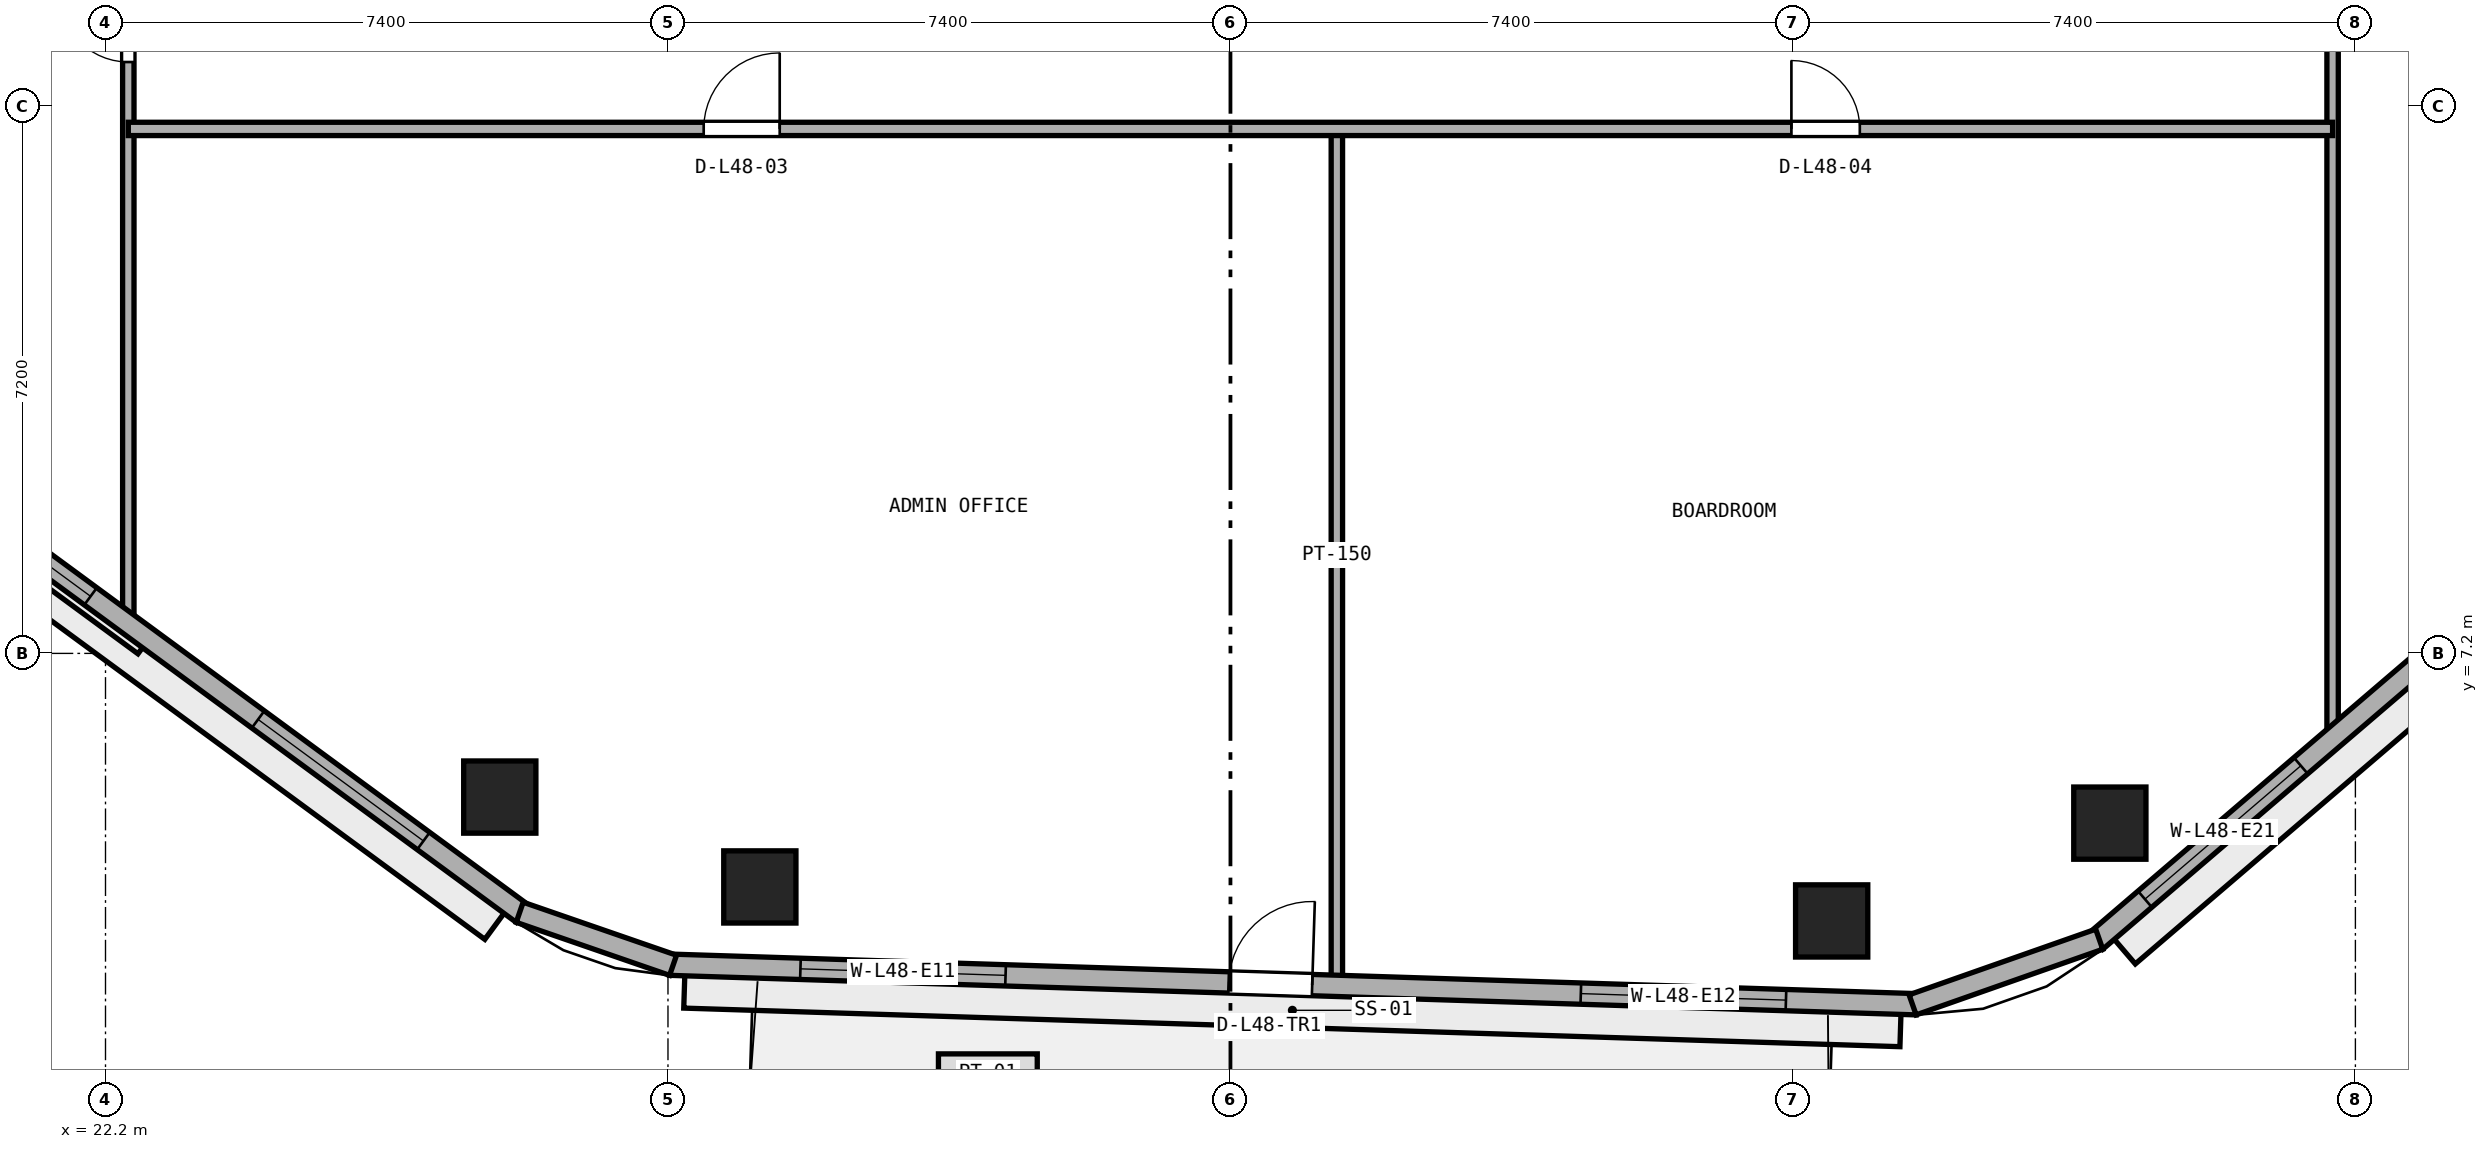
"""IFC4 building model, lengths in metres.
Left out: names, types, materials, properties, quantities, classifications, styles, units other than length and angle.
Written with IfcOpenShell. Run it as: python <this file> out.ifc"""

import sys

from ifc_helpers import new_model, si_unit, direction, frame, frame_2d, origin, origin_2d, place, context, subcontext, project, spatial, rectangle, extrude, element, fill, save


model = new_model("IFC4")
c1 = context("Model", 3, precision=1e-05, world=origin(), true_north=direction((0.0, 1.0)))
c2 = subcontext(c1, "Body", "Model", "MODEL_VIEW")
j1 = project(units=[si_unit("LENGTHUNIT", "METRE"), si_unit("PLANEANGLEUNIT", "RADIAN")], contexts=[c1])
p1 = place(None, origin())
s1 = spatial("IfcSite", under=j1, at=p1, CompositionType="ELEMENT")
p2 = place(p1, origin())
s2 = spatial("IfcBuilding", under=s1, at=p2, CompositionType="ELEMENT")
p3 = place(p2, frame((0.0, 0.0, 189.6)))
s3 = spatial("IfcBuildingStorey", under=s2, at=p3, CompositionType="ELEMENT", Elevation=189.6)
for number, where, z_axis, x_axis in (
    (1, (30.809, 4.127, 0.0), (0.0, 0.0, 1.0), (1.0, 0.0, 0.0)),
    (2, (44.91, 3.68, 0.0), (0.0, 0.0, 1.0), (1.0, 0.0, 0.0)),
    (3, (48.57, 4.967, 0.0), (0.0, 0.0, 1.0), (1.0, 0.0, 0.0)),
    (4, (27.387, 5.31, 0.0), (0.0, 0.0, 1.0), (1.0, 0.0, 0.0)),
):
    element("IfcColumn", number, at=place(p3, frame(where, z_axis=z_axis, x_axis=x_axis)), inside=s3, PredefinedType="COLUMN", context=c2, shape_type="SweptSolid", body=[
        extrude(rectangle(XDim=0.95, YDim=0.95, at=origin_2d()), origin(), (0.0, 0.0, 1.0), 3.8),
    ])
p4 = place(p3, frame((51.5, 6.036, 0.0), z_axis=(0.0, 0.0, 1.0), x_axis=(0.0, 1.0, 0.0)))
e5 = element("IfcWall", 5, at=p4, inside=s3, PredefinedType="PARTITIONING", context=c2, shape_type="SweptSolid", body=[
    extrude(rectangle(XDim=17.814, YDim=0.15, at=frame_2d((8.907, 0.0))), origin(), (0.0, 0.0, 1.0), 3.54),
])
p5 = place(p4, frame((10.464, 0.0, 0.0)))
e6 = element("IfcOpeningElement", 6, at=p5, cuts=e5, PredefinedType="OPENING", context=c2, shape_type="SweptSolid", body=[
    extrude(rectangle(XDim=0.9, YDim=2.1, at=frame_2d((0.45, 1.05))), frame((0.0, 0.085, 0.0), z_axis=(0.0, -1.0, 0.0), x_axis=(1.0, 0.0, 0.0)), (0.0, 0.0, 1.0), 0.17),
])
p6 = place(p3, frame((38.4, 2.891, 0.0), z_axis=(0.0, 0.0, 1.0), x_axis=(0.0, 1.0, 0.0)))
e7 = element("IfcWall", 7, at=p6, inside=s3, PredefinedType="PARTITIONING", context=c2, shape_type="SweptSolid", body=[
    extrude(rectangle(XDim=11.209, YDim=0.15, at=frame_2d((5.604, 0.0))), origin(), (0.0, 0.0, 1.0), 3.54),
])
p7 = place(p3, frame((22.5, 7.552, 0.0), z_axis=(0.0, 0.0, 1.0), x_axis=(0.0, 1.0, 0.0)))
e8 = element("IfcWall", 8, at=p7, inside=s3, PredefinedType="PARTITIONING", context=c2, shape_type="SweptSolid", body=[
    extrude(rectangle(XDim=9.448, YDim=0.15, at=frame_2d((4.724, 0.0))), origin(), (0.0, 0.0, 1.0), 3.54),
])
p8 = place(p7, frame((7.427, 0.0, 0.0)))
e9 = element("IfcOpeningElement", 9, at=p8, cuts=e8, PredefinedType="OPENING", context=c2, shape_type="SweptSolid", body=[
    extrude(rectangle(XDim=0.9, YDim=2.1, at=frame_2d((0.45, 1.05))), frame((0.0, 0.085, 0.0), z_axis=(0.0, -1.0, 0.0), x_axis=(1.0, 0.0, 0.0)), (0.0, 0.0, 1.0), 0.17),
])
p9 = place(p3, frame((22.5, 14.1, 0.0), z_axis=(0.0, 0.0, 1.0), x_axis=(1.0, 0.0, 0.0)))
e10 = element("IfcWall", 10, at=p9, inside=s3, PredefinedType="PARTITIONING", context=c2, shape_type="SweptSolid", body=[
    extrude(rectangle(XDim=29.0, YDim=0.175, at=frame_2d((14.5, 0.0))), origin(), (0.0, 0.0, 1.0), 3.54),
])
p10 = place(p9, frame((7.57, 0.0, 0.0)))
e11 = element("IfcOpeningElement", 11, at=p10, cuts=e10, PredefinedType="OPENING", context=c2, shape_type="SweptSolid", body=[
    extrude(rectangle(XDim=1.0, YDim=2.12, at=frame_2d((0.5, 1.06))), frame((0.0, 0.097, 0.0), z_axis=(0.0, -1.0, 0.0), x_axis=(1.0, 0.0, 0.0)), (0.0, 0.0, 1.0), 0.195),
])
p11 = place(p9, frame((21.88, 0.0, 0.0)))
e12 = element("IfcOpeningElement", 12, at=p11, cuts=e10, PredefinedType="OPENING", context=c2, shape_type="SweptSolid", body=[
    extrude(rectangle(XDim=0.9, YDim=2.1, at=frame_2d((0.45, 1.05))), frame((0.0, 0.097, 0.0), z_axis=(0.0, -1.0, 0.0), x_axis=(1.0, 0.0, 0.0)), (0.0, 0.0, 1.0), 0.195),
])
p12 = place(p3, frame((29.625, 3.104, 0.0), z_axis=(0.0, 0.0, 1.0), x_axis=(0.99949718661, -0.031707632487, 0.0)))
e13 = element("IfcWall", 13, at=p12, inside=s3, PredefinedType="STANDARD", context=c2, shape_type="SweptSolid", body=[
    extrude(rectangle(XDim=16.408, YDim=0.28, at=frame_2d((8.204, 0.0))), origin(), (0.0, 0.0, 1.0), 3.54),
])
p13 = place(p12, frame((7.354, 0.0, 0.0)))
e14 = element("IfcOpeningElement", 14, at=p13, cuts=e13, PredefinedType="OPENING", context=c2, shape_type="SweptSolid", body=[
    extrude(rectangle(XDim=1.1, YDim=2.2, at=frame_2d((0.55, 1.1))), frame((0.0, 0.15, 0.0), z_axis=(0.0, -1.0, 0.0), x_axis=(1.0, 0.0, 0.0)), (0.0, 0.0, 1.0), 0.3),
])
p14 = place(p12, frame((1.718, 0.0, 0.9)))
e15 = element("IfcOpeningElement", 15, at=p14, cuts=e13, PredefinedType="OPENING", context=c2, shape_type="SweptSolid", body=[
    extrude(rectangle(XDim=2.7, YDim=1.75, at=frame_2d((1.35, 0.875))), frame((0.0, 0.15, 0.0), z_axis=(0.0, -1.0, 0.0), x_axis=(1.0, 0.0, 0.0)), (0.0, 0.0, 1.0), 0.3),
])
p15 = place(p12, frame((11.99, 0.0, 0.9)))
e16 = element("IfcOpeningElement", 16, at=p15, cuts=e13, PredefinedType="OPENING", context=c2, shape_type="SweptSolid", body=[
    extrude(rectangle(XDim=2.7, YDim=1.75, at=frame_2d((1.35, 0.875))), frame((0.0, 0.15, 0.0), z_axis=(0.0, -1.0, 0.0), x_axis=(1.0, 0.0, 0.0)), (0.0, 0.0, 1.0), 0.3),
])
p16 = place(p3, frame((48.385, 3.414, 0.0), z_axis=(0.0, 0.0, 1.0), x_axis=(0.759700260779, 0.650273414628, 0.0)))
e17 = element("IfcWall", 17, at=p16, inside=s3, PredefinedType="STANDARD", context=c2, shape_type="SweptSolid", body=[
    extrude(rectangle(XDim=15.881, YDim=0.28, at=frame_2d((7.94, 0.0))), origin(), (0.0, 0.0, 1.0), 3.54),
])
p17 = place(p16, frame((0.85, 0.0, 0.9)))
e18 = element("IfcOpeningElement", 18, at=p17, cuts=e17, PredefinedType="OPENING", context=c2, shape_type="SweptSolid", body=[
    extrude(rectangle(XDim=2.7, YDim=1.75, at=frame_2d((1.35, 0.875))), frame((0.0, 0.15, 0.0), z_axis=(0.0, -1.0, 0.0), x_axis=(1.0, 0.0, 0.0)), (0.0, 0.0, 1.0), 0.3),
])
p18 = place(p16, frame((6.59, 0.0, 0.9)))
e19 = element("IfcOpeningElement", 19, at=p18, cuts=e17, PredefinedType="OPENING", context=c2, shape_type="SweptSolid", body=[
    extrude(rectangle(XDim=2.7, YDim=1.75, at=frame_2d((1.35, 0.875))), frame((0.0, 0.15, 0.0), z_axis=(0.0, -1.0, 0.0), x_axis=(1.0, 0.0, 0.0)), (0.0, 0.0, 1.0), 0.3),
])
p19 = place(p16, frame((11.551, 0.0, 0.9)))
e20 = element("IfcOpeningElement", 20, at=p19, cuts=e17, PredefinedType="OPENING", context=c2, shape_type="SweptSolid", body=[
    extrude(rectangle(XDim=2.7, YDim=1.75, at=frame_2d((1.35, 0.875))), frame((0.0, 0.15, 0.0), z_axis=(0.0, -1.0, 0.0), x_axis=(1.0, 0.0, 0.0)), (0.0, 0.0, 1.0), 0.3),
])
p20 = place(p3, frame((14.951, 13.134, 0.0), z_axis=(0.0, 0.0, 1.0), x_axis=(0.805804940328, -0.592181051827, 0.0)))
e21 = element("IfcWall", 21, at=p20, inside=s3, PredefinedType="STANDARD", context=c2, shape_type="SweptSolid", body=[
    extrude(rectangle(XDim=15.804, YDim=0.28, at=frame_2d((7.902, 0.0))), origin(), (0.0, 0.0, 1.0), 3.54),
])
p21 = place(p20, frame((1.617, 0.0, 0.9)))
e22 = element("IfcOpeningElement", 22, at=p21, cuts=e21, PredefinedType="OPENING", context=c2, shape_type="SweptSolid", body=[
    extrude(rectangle(XDim=2.7, YDim=1.75, at=frame_2d((1.35, 0.875))), frame((0.0, 0.15, 0.0), z_axis=(0.0, -1.0, 0.0), x_axis=(1.0, 0.0, 0.0)), (0.0, 0.0, 1.0), 0.3),
])
p22 = place(p20, frame((6.052, 0.0, 0.9)))
e23 = element("IfcOpeningElement", 23, at=p22, cuts=e21, PredefinedType="OPENING", context=c2, shape_type="SweptSolid", body=[
    extrude(rectangle(XDim=2.7, YDim=1.75, at=frame_2d((1.35, 0.875))), frame((0.0, 0.15, 0.0), z_axis=(0.0, -1.0, 0.0), x_axis=(1.0, 0.0, 0.0)), (0.0, 0.0, 1.0), 0.3),
])
p23 = place(p20, frame((11.487, 0.0, 0.9)))
e24 = element("IfcOpeningElement", 24, at=p23, cuts=e21, PredefinedType="OPENING", context=c2, shape_type="SweptSolid", body=[
    extrude(rectangle(XDim=2.7, YDim=1.75, at=frame_2d((1.35, 0.875))), frame((0.0, 0.15, 0.0), z_axis=(0.0, -1.0, 0.0), x_axis=(1.0, 0.0, 0.0)), (0.0, 0.0, 1.0), 0.3),
])
p24 = place(p3, frame((45.975, 2.576, 0.0), z_axis=(0.0, 0.0, 1.0), x_axis=(0.943377643365, 0.331720698781, 0.0)))
e25 = element("IfcWall", 25, at=p24, inside=s3, PredefinedType="STANDARD", context=c2, shape_type="SweptSolid", body=[
    extrude(rectangle(XDim=2.603, YDim=0.28, at=frame_2d((1.301, 0.0))), origin(), (0.0, 0.0, 1.0), 3.54),
])
p25 = place(p3, frame((27.649, 3.794, 0.0), z_axis=(0.0, 0.0, 1.0), x_axis=(0.945149124969, -0.326639145802, 0.0)))
e26 = element("IfcWall", 26, at=p25, inside=s3, PredefinedType="STANDARD", context=c2, shape_type="SweptSolid", body=[
    extrude(rectangle(XDim=2.135, YDim=0.28, at=frame_2d((1.067, 0.0))), origin(), (0.0, 0.0, 1.0), 3.54),
])
p26 = place(p10, origin())
e27 = element("IfcDoor", 27, at=p26, inside=s3, OperationType="SINGLE_SWING_RIGHT", PredefinedType="DOOR", context=c2, shape_type="SweptSolid", body=[
    extrude(rectangle(XDim=1.0, YDim=2.12, at=frame_2d((0.5, 1.06))), frame((0.0, 0.025, 0.0), z_axis=(0.0, -1.0, 0.0), x_axis=(1.0, 0.0, 0.0)), (0.0, 0.0, 1.0), 0.05),
])
fill(e11, e27)
p27 = place(p11, origin())
e28 = element("IfcDoor", 28, at=p27, inside=s3, OperationType="SINGLE_SWING_LEFT", PredefinedType="DOOR", context=c2, shape_type="SweptSolid", body=[
    extrude(rectangle(XDim=0.9, YDim=2.1, at=frame_2d((0.45, 1.05))), frame((0.0, 0.025, 0.0), z_axis=(0.0, -1.0, 0.0), x_axis=(1.0, 0.0, 0.0)), (0.0, 0.0, 1.0), 0.05),
])
fill(e12, e28)
p28 = place(p8, origin())
e29 = element("IfcDoor", 29, at=p28, inside=s3, OperationType="SINGLE_SWING_RIGHT", PredefinedType="DOOR", context=c2, shape_type="SweptSolid", body=[
    extrude(rectangle(XDim=0.9, YDim=2.1, at=frame_2d((0.45, 1.05))), frame((0.0, 0.025, 0.0), z_axis=(0.0, -1.0, 0.0), x_axis=(1.0, 0.0, 0.0)), (0.0, 0.0, 1.0), 0.05),
])
fill(e9, e29)
p29 = place(p13, origin())
e30 = element("IfcDoor", 30, at=p29, inside=s3, OperationType="SINGLE_SWING_RIGHT", PredefinedType="DOOR", context=c2, shape_type="SweptSolid", body=[
    extrude(rectangle(XDim=1.1, YDim=2.2, at=frame_2d((0.55, 1.1))), frame((0.0, 0.025, 0.0), z_axis=(0.0, -1.0, 0.0), x_axis=(1.0, 0.0, 0.0)), (0.0, 0.0, 1.0), 0.05),
])
fill(e14, e30)
p30 = place(p14, origin())
e31 = element("IfcWindow", 31, at=p30, inside=s3, PartitioningType="SINGLE_PANEL", PredefinedType="WINDOW", context=c2, shape_type="SweptSolid", body=[
    extrude(rectangle(XDim=2.7, YDim=1.75, at=frame_2d((1.35, 0.875))), frame((0.0, 0.03, 0.0), z_axis=(0.0, -1.0, 0.0), x_axis=(1.0, 0.0, 0.0)), (0.0, 0.0, 1.0), 0.06),
])
fill(e15, e31)
p31 = place(p15, origin())
e32 = element("IfcWindow", 32, at=p31, inside=s3, PartitioningType="SINGLE_PANEL", PredefinedType="WINDOW", context=c2, shape_type="SweptSolid", body=[
    extrude(rectangle(XDim=2.7, YDim=1.75, at=frame_2d((1.35, 0.875))), frame((0.0, 0.03, 0.0), z_axis=(0.0, -1.0, 0.0), x_axis=(1.0, 0.0, 0.0)), (0.0, 0.0, 1.0), 0.06),
])
fill(e16, e32)
p32 = place(p17, origin())
e33 = element("IfcWindow", 33, at=p32, inside=s3, PartitioningType="SINGLE_PANEL", PredefinedType="WINDOW", context=c2, shape_type="SweptSolid", body=[
    extrude(rectangle(XDim=2.7, YDim=1.75, at=frame_2d((1.35, 0.875))), frame((0.0, 0.03, 0.0), z_axis=(0.0, -1.0, 0.0), x_axis=(1.0, 0.0, 0.0)), (0.0, 0.0, 1.0), 0.06),
])
fill(e18, e33)
p33 = place(p22, origin())
e34 = element("IfcWindow", 34, at=p33, inside=s3, PartitioningType="SINGLE_PANEL", PredefinedType="WINDOW", context=c2, shape_type="SweptSolid", body=[
    extrude(rectangle(XDim=2.7, YDim=1.75, at=frame_2d((1.35, 0.875))), frame((0.0, 0.03, 0.0), z_axis=(0.0, -1.0, 0.0), x_axis=(1.0, 0.0, 0.0)), (0.0, 0.0, 1.0), 0.06),
])
fill(e23, e34)
p34 = place(p23, origin())
e35 = element("IfcWindow", 35, at=p34, inside=s3, PartitioningType="SINGLE_PANEL", PredefinedType="WINDOW", context=c2, shape_type="SweptSolid", body=[
    extrude(rectangle(XDim=2.7, YDim=1.75, at=frame_2d((1.35, 0.875))), frame((0.0, 0.03, 0.0), z_axis=(0.0, -1.0, 0.0), x_axis=(1.0, 0.0, 0.0)), (0.0, 0.0, 1.0), 0.06),
])
fill(e24, e35)
save(model, sys.argv[1])
